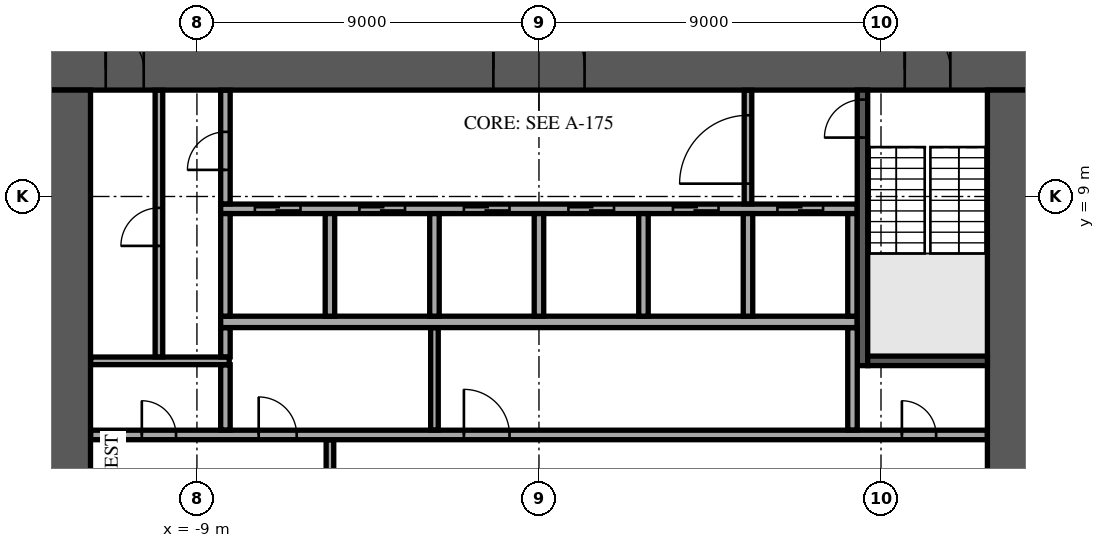
"""IFC4 building model, lengths in metres.
Left out: names, types, materials, properties, quantities, classifications, styles, units other than length and angle.
Written with IfcOpenShell. Run it as: python <this file> out.ifc"""

import sys

from ifc_helpers import new_model, si_unit, direction, frame, frame_2d, origin, place, context, subcontext, project, spatial, rectangle, extrude, element, fill, save


model = new_model("IFC4")
c1 = context("Model", 3, precision=1e-05, world=origin(), true_north=direction((0.0, 1.0)))
c2 = subcontext(c1, "Body", "Model", "MODEL_VIEW")
j1 = project(units=[si_unit("LENGTHUNIT", "METRE"), si_unit("PLANEANGLEUNIT", "RADIAN")], contexts=[c1])
p1 = place(None, origin())
s1 = spatial("IfcSite", under=j1, at=p1, CompositionType="ELEMENT")
p2 = place(p1, origin())
s2 = spatial("IfcBuilding", under=s1, at=p2, CompositionType="ELEMENT")
p3 = place(p2, frame((0.0, 0.0, 82.1)))
s3 = spatial("IfcBuildingStorey", under=s2, at=p3, CompositionType="ELEMENT", Elevation=82.1)
p4 = place(p3, frame((-12.9, 12.35, 0.0), z_axis=(0.0, 0.0, 1.0), x_axis=(1.0, 0.0, 0.0)))
e1 = element("IfcWall", 1, at=p4, inside=s3, PredefinedType="SHEAR", context=c2, shape_type="SweptSolid", body=[
    extrude(rectangle(XDim=25.8, YDim=1.1, at=frame_2d((12.9, 0.0))), origin(), (0.0, 0.0, 1.0), 3.58),
])
p5 = place(p4, frame((11.7, 0.0, 0.0)))
e2 = element("IfcOpeningElement", 2, at=p5, cuts=e1, PredefinedType="OPENING", context=c2, shape_type="SweptSolid", body=[
    extrude(rectangle(XDim=2.4, YDim=2.4, at=frame_2d((1.2, 1.2))), frame((0.0, 0.56, 0.0), z_axis=(0.0, -1.0, 0.0), x_axis=(1.0, 0.0, 0.0)), (0.0, 0.0, 1.0), 1.12),
])
p6 = place(p4, frame((22.525, 0.0, 0.0)))
e3 = element("IfcOpeningElement", 3, at=p6, cuts=e1, PredefinedType="OPENING", context=c2, shape_type="SweptSolid", body=[
    extrude(rectangle(XDim=1.2, YDim=2.1, at=frame_2d((0.6, 1.05))), frame((0.0, 0.56, 0.0), z_axis=(0.0, -1.0, 0.0), x_axis=(1.0, 0.0, 0.0)), (0.0, 0.0, 1.0), 1.12),
])
p7 = place(p4, frame((1.5, 0.0, 0.0)))
e4 = element("IfcOpeningElement", 4, at=p7, cuts=e1, PredefinedType="OPENING", context=c2, shape_type="SweptSolid", body=[
    extrude(rectangle(XDim=1.0, YDim=2.1, at=frame_2d((0.5, 1.05))), frame((0.0, 0.56, 0.0), z_axis=(0.0, -1.0, 0.0), x_axis=(1.0, 0.0, 0.0)), (0.0, 0.0, 1.0), 1.12),
])
p8 = place(p3, frame((12.35, -11.8, 0.0), z_axis=(0.0, 0.0, 1.0), x_axis=(0.0, 1.0, 0.0)))
e5 = element("IfcWall", 5, at=p8, inside=s3, PredefinedType="SHEAR", context=c2, shape_type="SweptSolid", body=[
    extrude(rectangle(XDim=23.6, YDim=1.1, at=frame_2d((11.8, 0.0))), origin(), (0.0, 0.0, 1.0), 3.58),
])
p9 = place(p8, frame((10.6, 0.0, 0.0)))
e6 = element("IfcOpeningElement", 6, at=p9, cuts=e5, PredefinedType="OPENING", context=c2, shape_type="SweptSolid", body=[
    extrude(rectangle(XDim=2.4, YDim=2.4, at=frame_2d((1.2, 1.2))), frame((0.0, 0.56, 0.0), z_axis=(0.0, -1.0, 0.0), x_axis=(1.0, 0.0, 0.0)), (0.0, 0.0, 1.0), 1.12),
])
p10 = place(p3, frame((-12.35, -11.8, 0.0), z_axis=(0.0, 0.0, 1.0), x_axis=(0.0, 1.0, 0.0)))
e7 = element("IfcWall", 7, at=p10, inside=s3, PredefinedType="SHEAR", context=c2, shape_type="SweptSolid", body=[
    extrude(rectangle(XDim=23.6, YDim=1.1, at=frame_2d((11.8, 0.0))), origin(), (0.0, 0.0, 1.0), 3.58),
])
p11 = place(p10, frame((10.6, 0.0, 0.0)))
e8 = element("IfcOpeningElement", 8, at=p11, cuts=e7, PredefinedType="OPENING", context=c2, shape_type="SweptSolid", body=[
    extrude(rectangle(XDim=2.4, YDim=2.4, at=frame_2d((1.2, 1.2))), frame((0.0, 0.56, 0.0), z_axis=(0.0, -1.0, 0.0), x_axis=(1.0, 0.0, 0.0)), (0.0, 0.0, 1.0), 1.12),
])
p12 = place(p3, frame((-8.375, 5.7, 0.0), z_axis=(0.0, 0.0, 1.0), x_axis=(1.0, 0.0, 0.0)))
e9 = element("IfcWall", 9, at=p12, inside=s3, PredefinedType="SOLIDWALL", context=c2, shape_type="SweptSolid", body=[
    extrude(rectangle(XDim=16.75, YDim=0.3, at=frame_2d((8.375, 0.0))), origin(), (0.0, 0.0, 1.0), 3.58),
])
p13 = place(p3, frame((-8.375, 8.675, 0.0), z_axis=(0.0, 0.0, 1.0), x_axis=(1.0, 0.0, 0.0)))
e10 = element("IfcWall", 10, at=p13, inside=s3, PredefinedType="SOLIDWALL", context=c2, shape_type="SweptSolid", body=[
    extrude(rectangle(XDim=16.75, YDim=0.25, at=frame_2d((8.375, 0.0))), origin(), (0.0, 0.0, 1.0), 3.58),
])
p14 = place(p13, frame((0.9, 0.0, 0.0)))
e11 = element("IfcOpeningElement", 11, at=p14, cuts=e10, PredefinedType="OPENING", context=c2, shape_type="SweptSolid", body=[
    extrude(rectangle(XDim=1.2, YDim=2.1, at=frame_2d((0.6, 1.05))), frame((0.0, 0.135, 0.0), z_axis=(0.0, -1.0, 0.0), x_axis=(1.0, 0.0, 0.0)), (0.0, 0.0, 1.0), 0.27),
])
p15 = place(p13, frame((3.65, 0.0, 0.0)))
e12 = element("IfcOpeningElement", 12, at=p15, cuts=e10, PredefinedType="OPENING", context=c2, shape_type="SweptSolid", body=[
    extrude(rectangle(XDim=1.2, YDim=2.1, at=frame_2d((0.6, 1.05))), frame((0.0, 0.135, 0.0), z_axis=(0.0, -1.0, 0.0), x_axis=(1.0, 0.0, 0.0)), (0.0, 0.0, 1.0), 0.27),
])
p16 = place(p13, frame((6.4, 0.0, 0.0)))
e13 = element("IfcOpeningElement", 13, at=p16, cuts=e10, PredefinedType="OPENING", context=c2, shape_type="SweptSolid", body=[
    extrude(rectangle(XDim=1.2, YDim=2.1, at=frame_2d((0.6, 1.05))), frame((0.0, 0.135, 0.0), z_axis=(0.0, -1.0, 0.0), x_axis=(1.0, 0.0, 0.0)), (0.0, 0.0, 1.0), 0.27),
])
p17 = place(p13, frame((9.15, 0.0, 0.0)))
e14 = element("IfcOpeningElement", 14, at=p17, cuts=e10, PredefinedType="OPENING", context=c2, shape_type="SweptSolid", body=[
    extrude(rectangle(XDim=1.2, YDim=2.1, at=frame_2d((0.6, 1.05))), frame((0.0, 0.135, 0.0), z_axis=(0.0, -1.0, 0.0), x_axis=(1.0, 0.0, 0.0)), (0.0, 0.0, 1.0), 0.27),
])
p18 = place(p13, frame((11.9, 0.0, 0.0)))
e15 = element("IfcOpeningElement", 15, at=p18, cuts=e10, PredefinedType="OPENING", context=c2, shape_type="SweptSolid", body=[
    extrude(rectangle(XDim=1.2, YDim=2.1, at=frame_2d((0.6, 1.05))), frame((0.0, 0.135, 0.0), z_axis=(0.0, -1.0, 0.0), x_axis=(1.0, 0.0, 0.0)), (0.0, 0.0, 1.0), 0.27),
])
p19 = place(p13, frame((14.65, 0.0, 0.0)))
e16 = element("IfcOpeningElement", 16, at=p19, cuts=e10, PredefinedType="OPENING", context=c2, shape_type="SweptSolid", body=[
    extrude(rectangle(XDim=1.2, YDim=2.1, at=frame_2d((0.6, 1.05))), frame((0.0, 0.135, 0.0), z_axis=(0.0, -1.0, 0.0), x_axis=(1.0, 0.0, 0.0)), (0.0, 0.0, 1.0), 0.27),
])
for number, where, z_axis, x_axis in (
    (17, (-8.25, 5.85, 0.0), (0.0, 0.0, 1.0), (0.0, 1.0, 0.0)),
    (18, (-5.5, 5.85, 0.0), (0.0, 0.0, 1.0), (0.0, 1.0, 0.0)),
    (19, (-2.75, 5.85, 0.0), (0.0, 0.0, 1.0), (0.0, 1.0, 0.0)),
    (20, (0.0, 5.85, 0.0), (0.0, 0.0, 1.0), (0.0, 1.0, 0.0)),
    (21, (2.75, 5.85, 0.0), (0.0, 0.0, 1.0), (0.0, 1.0, 0.0)),
    (22, (5.5, 5.85, 0.0), (0.0, 0.0, 1.0), (0.0, 1.0, 0.0)),
    (23, (8.25, 5.85, 0.0), (0.0, 0.0, 1.0), (0.0, 1.0, 0.0)),
):
    element("IfcWall", number, at=place(p3, frame(where, z_axis=z_axis, x_axis=x_axis)), inside=s3, PredefinedType="SOLIDWALL", context=c2, shape_type="SweptSolid", body=[
        extrude(rectangle(XDim=2.7, YDim=0.25, at=frame_2d((1.35, 0.0))), origin(), (0.0, 0.0, 1.0), 3.58),
    ])
p20 = place(p3, frame((8.512, 4.55, 0.0), z_axis=(0.0, 0.0, 1.0), x_axis=(0.0, 1.0, 0.0)))
e24 = element("IfcWall", 24, at=p20, inside=s3, PredefinedType="SOLIDWALL", context=c2, shape_type="SweptSolid", body=[
    extrude(rectangle(XDim=7.25, YDim=0.275, at=frame_2d((3.625, 0.0))), origin(), (0.0, 0.0, 1.0), 3.58),
])
p21 = place(p20, frame((6.0, 0.0, 0.0)))
e25 = element("IfcOpeningElement", 25, at=p21, cuts=e24, PredefinedType="OPENING", context=c2, shape_type="SweptSolid", body=[
    extrude(rectangle(XDim=1.0, YDim=2.1, at=frame_2d((0.5, 1.05))), frame((0.0, 0.147, 0.0), z_axis=(0.0, -1.0, 0.0), x_axis=(1.0, 0.0, 0.0)), (0.0, 0.0, 1.0), 0.295),
])
p22 = place(p3, frame((8.65, 4.675, 0.0), z_axis=(0.0, 0.0, 1.0), x_axis=(1.0, 0.0, 0.0)))
e26 = element("IfcWall", 26, at=p22, inside=s3, PredefinedType="SOLIDWALL", context=c2, shape_type="SweptSolid", body=[
    extrude(rectangle(XDim=3.15, YDim=0.25, at=frame_2d((1.575, 0.0))), origin(), (0.0, 0.0, 1.0), 3.58),
])
p23 = place(p3, frame((-5.5, -2.595, 0.0), z_axis=(0.0, 0.0, 1.0), x_axis=(0.0, 1.0, 0.0)))
e27 = element("IfcWall", 27, at=p23, inside=s3, PredefinedType="PARTITIONING", context=c2, shape_type="SweptSolid", body=[
    extrude(rectangle(XDim=5.19, YDim=0.2, at=frame_2d((2.595, 0.0))), origin(), (0.0, 0.0, 1.0), 3.58),
])
p24 = place(p23, frame((1.395, 0.0, 0.0)))
e28 = element("IfcOpeningElement", 28, at=p24, cuts=e27, PredefinedType="OPENING", context=c2, shape_type="SweptSolid", body=[
    extrude(rectangle(XDim=2.4, YDim=2.4, at=frame_2d((1.2, 1.2))), frame((0.0, 0.11, 0.0), z_axis=(0.0, -1.0, 0.0), x_axis=(1.0, 0.0, 0.0)), (0.0, 0.0, 1.0), 0.22),
])
p25 = place(p3, frame((-11.795, 2.725, 0.0), z_axis=(0.0, 0.0, 1.0), x_axis=(1.0, 0.0, 0.0)))
e29 = element("IfcWall", 29, at=p25, inside=s3, PredefinedType="PARTITIONING", context=c2, shape_type="SweptSolid", body=[
    extrude(rectangle(XDim=23.59, YDim=0.25, at=frame_2d((11.795, 0.0))), origin(), (0.0, 0.0, 1.0), 3.58),
])
p26 = place(p25, frame((21.345, 0.0, 0.0)))
e30 = element("IfcOpeningElement", 30, at=p26, cuts=e29, PredefinedType="OPENING", context=c2, shape_type="SweptSolid", body=[
    extrude(rectangle(XDim=0.9, YDim=2.1, at=frame_2d((0.45, 1.05))), frame((0.0, 0.135, 0.0), z_axis=(0.0, -1.0, 0.0), x_axis=(1.0, 0.0, 0.0)), (0.0, 0.0, 1.0), 0.27),
])
p27 = place(p25, frame((1.345, 0.0, 0.0)))
e31 = element("IfcOpeningElement", 31, at=p27, cuts=e29, PredefinedType="OPENING", context=c2, shape_type="SweptSolid", body=[
    extrude(rectangle(XDim=0.9, YDim=2.1, at=frame_2d((0.45, 1.05))), frame((0.0, 0.135, 0.0), z_axis=(0.0, -1.0, 0.0), x_axis=(1.0, 0.0, 0.0)), (0.0, 0.0, 1.0), 0.27),
])
p28 = place(p25, frame((4.42, 0.0, 0.0)))
e32 = element("IfcOpeningElement", 32, at=p28, cuts=e29, PredefinedType="OPENING", context=c2, shape_type="SweptSolid", body=[
    extrude(rectangle(XDim=1.0, YDim=2.1, at=frame_2d((0.5, 1.05))), frame((0.0, 0.135, 0.0), z_axis=(0.0, -1.0, 0.0), x_axis=(1.0, 0.0, 0.0)), (0.0, 0.0, 1.0), 0.27),
])
p29 = place(p25, frame((9.82, 0.0, 0.0)))
e33 = element("IfcOpeningElement", 33, at=p29, cuts=e29, PredefinedType="OPENING", context=c2, shape_type="SweptSolid", body=[
    extrude(rectangle(XDim=1.2, YDim=2.1, at=frame_2d((0.6, 1.05))), frame((0.0, 0.135, 0.0), z_axis=(0.0, -1.0, 0.0), x_axis=(1.0, 0.0, 0.0)), (0.0, 0.0, 1.0), 0.27),
])
p30 = place(p3, frame((-8.25, 2.855, 0.0), z_axis=(0.0, 0.0, 1.0), x_axis=(0.0, 1.0, 0.0)))
e34 = element("IfcWall", 34, at=p30, inside=s3, PredefinedType="PARTITIONING", context=c2, shape_type="SweptSolid", body=[
    extrude(rectangle(XDim=1.715, YDim=0.25, at=frame_2d((0.857, 0.0))), origin(), (0.0, 0.0, 1.0), 3.58),
])
p31 = place(p3, frame((-2.75, 2.855, 0.0), z_axis=(0.0, 0.0, 1.0), x_axis=(0.0, 1.0, 0.0)))
e35 = element("IfcWall", 35, at=p31, inside=s3, PredefinedType="PARTITIONING", context=c2, shape_type="SweptSolid", body=[
    extrude(rectangle(XDim=2.69, YDim=0.2, at=frame_2d((1.345, 0.0))), origin(), (0.0, 0.0, 1.0), 3.58),
])
p32 = place(p3, frame((8.25, 2.855, 0.0), z_axis=(0.0, 0.0, 1.0), x_axis=(0.0, 1.0, 0.0)))
e36 = element("IfcWall", 36, at=p32, inside=s3, PredefinedType="PARTITIONING", context=c2, shape_type="SweptSolid", body=[
    extrude(rectangle(XDim=2.69, YDim=0.25, at=frame_2d((1.345, 0.0))), origin(), (0.0, 0.0, 1.0), 3.58),
])
p33 = place(p3, frame((-11.795, 4.675, 0.0), z_axis=(0.0, 0.0, 1.0), x_axis=(1.0, 0.0, 0.0)))
e37 = element("IfcWall", 37, at=p33, inside=s3, PredefinedType="PARTITIONING", context=c2, shape_type="SweptSolid", body=[
    extrude(rectangle(XDim=3.645, YDim=0.2, at=frame_2d((1.823, 0.0))), origin(), (0.0, 0.0, 1.0), 3.58),
])
p34 = place(p3, frame((-10.0, 4.78, 0.0), z_axis=(0.0, 0.0, 1.0), x_axis=(0.0, 1.0, 0.0)))
e38 = element("IfcWall", 38, at=p34, inside=s3, PredefinedType="PARTITIONING", context=c2, shape_type="SweptSolid", body=[
    extrude(rectangle(XDim=7.015, YDim=0.2, at=frame_2d((3.507, 0.0))), origin(), (0.0, 0.0, 1.0), 3.58),
])
p35 = place(p34, frame((2.92, 0.0, 0.0)))
e39 = element("IfcOpeningElement", 39, at=p35, cuts=e38, PredefinedType="OPENING", context=c2, shape_type="SweptSolid", body=[
    extrude(rectangle(XDim=1.0, YDim=2.1, at=frame_2d((0.5, 1.05))), frame((0.0, 0.11, 0.0), z_axis=(0.0, -1.0, 0.0), x_axis=(1.0, 0.0, 0.0)), (0.0, 0.0, 1.0), 0.22),
])
p36 = place(p3, frame((-8.25, 4.78, 0.0), z_axis=(0.0, 0.0, 1.0), x_axis=(0.0, 1.0, 0.0)))
e40 = element("IfcWall", 40, at=p36, inside=s3, PredefinedType="PARTITIONING", context=c2, shape_type="SweptSolid", body=[
    extrude(rectangle(XDim=0.765, YDim=0.25, at=frame_2d((0.382, 0.0))), origin(), (0.0, 0.0, 1.0), 3.58),
])
p37 = place(p3, frame((-8.25, 8.805, 0.0), z_axis=(0.0, 0.0, 1.0), x_axis=(0.0, 1.0, 0.0)))
e41 = element("IfcWall", 41, at=p37, inside=s3, PredefinedType="PARTITIONING", context=c2, shape_type="SweptSolid", body=[
    extrude(rectangle(XDim=2.99, YDim=0.25, at=frame_2d((1.495, 0.0))), origin(), (0.0, 0.0, 1.0), 3.58),
])
p38 = place(p37, frame((0.895, 0.0, 0.0)))
e42 = element("IfcOpeningElement", 42, at=p38, cuts=e41, PredefinedType="OPENING", context=c2, shape_type="SweptSolid", body=[
    extrude(rectangle(XDim=1.0, YDim=2.1, at=frame_2d((0.5, 1.05))), frame((0.0, 0.135, 0.0), z_axis=(0.0, -1.0, 0.0), x_axis=(1.0, 0.0, 0.0)), (0.0, 0.0, 1.0), 0.27),
])
p39 = place(p3, frame((5.5, 8.805, 0.0), z_axis=(0.0, 0.0, 1.0), x_axis=(0.0, 1.0, 0.0)))
e43 = element("IfcWall", 43, at=p39, inside=s3, PredefinedType="PARTITIONING", context=c2, shape_type="SweptSolid", body=[
    extrude(rectangle(XDim=2.99, YDim=0.2, at=frame_2d((1.495, 0.0))), origin(), (0.0, 0.0, 1.0), 3.58),
])
p40 = place(p39, frame((0.532, 0.0, 0.0)))
e44 = element("IfcOpeningElement", 44, at=p40, cuts=e43, PredefinedType="OPENING", context=c2, shape_type="SweptSolid", body=[
    extrude(rectangle(XDim=1.8, YDim=2.1, at=frame_2d((0.9, 1.05))), frame((0.0, 0.11, 0.0), z_axis=(0.0, -1.0, 0.0), x_axis=(1.0, 0.0, 0.0)), (0.0, 0.0, 1.0), 0.22),
])
p41 = place(p5, origin())
e45 = element("IfcDoor", 45, at=p41, inside=s3, OperationType="SINGLE_SWING_LEFT", PredefinedType="DOOR", context=c2, shape_type="SweptSolid", body=[
    extrude(rectangle(XDim=2.4, YDim=2.4, at=frame_2d((1.2, 1.2))), frame((0.0, 0.025, 0.0), z_axis=(0.0, -1.0, 0.0), x_axis=(1.0, 0.0, 0.0)), (0.0, 0.0, 1.0), 0.05),
])
fill(e2, e45)
p42 = place(p6, origin())
e46 = element("IfcDoor", 46, at=p42, inside=s3, OperationType="SINGLE_SWING_LEFT", PredefinedType="DOOR", context=c2, shape_type="SweptSolid", body=[
    extrude(rectangle(XDim=1.2, YDim=2.1, at=frame_2d((0.6, 1.05))), frame((0.0, 0.025, 0.0), z_axis=(0.0, -1.0, 0.0), x_axis=(1.0, 0.0, 0.0)), (0.0, 0.0, 1.0), 0.05),
])
fill(e3, e46)
p43 = place(p7, origin())
e47 = element("IfcDoor", 47, at=p43, inside=s3, OperationType="SINGLE_SWING_LEFT", PredefinedType="DOOR", context=c2, shape_type="SweptSolid", body=[
    extrude(rectangle(XDim=1.0, YDim=2.1, at=frame_2d((0.5, 1.05))), frame((0.0, 0.025, 0.0), z_axis=(0.0, -1.0, 0.0), x_axis=(1.0, 0.0, 0.0)), (0.0, 0.0, 1.0), 0.05),
])
fill(e4, e47)
p44 = place(p14, origin())
e48 = element("IfcDoor", 48, at=p44, inside=s3, OperationType="DOUBLE_DOOR_SLIDING", PredefinedType="DOOR", context=c2, shape_type="SweptSolid", body=[
    extrude(rectangle(XDim=1.2, YDim=2.1, at=frame_2d((0.6, 1.05))), frame((0.0, 0.025, 0.0), z_axis=(0.0, -1.0, 0.0), x_axis=(1.0, 0.0, 0.0)), (0.0, 0.0, 1.0), 0.05),
])
fill(e11, e48)
p45 = place(p15, origin())
e49 = element("IfcDoor", 49, at=p45, inside=s3, OperationType="DOUBLE_DOOR_SLIDING", PredefinedType="DOOR", context=c2, shape_type="SweptSolid", body=[
    extrude(rectangle(XDim=1.2, YDim=2.1, at=frame_2d((0.6, 1.05))), frame((0.0, 0.025, 0.0), z_axis=(0.0, -1.0, 0.0), x_axis=(1.0, 0.0, 0.0)), (0.0, 0.0, 1.0), 0.05),
])
fill(e12, e49)
p46 = place(p16, origin())
e50 = element("IfcDoor", 50, at=p46, inside=s3, OperationType="DOUBLE_DOOR_SLIDING", PredefinedType="DOOR", context=c2, shape_type="SweptSolid", body=[
    extrude(rectangle(XDim=1.2, YDim=2.1, at=frame_2d((0.6, 1.05))), frame((0.0, 0.025, 0.0), z_axis=(0.0, -1.0, 0.0), x_axis=(1.0, 0.0, 0.0)), (0.0, 0.0, 1.0), 0.05),
])
fill(e13, e50)
p47 = place(p17, origin())
e51 = element("IfcDoor", 51, at=p47, inside=s3, OperationType="DOUBLE_DOOR_SLIDING", PredefinedType="DOOR", context=c2, shape_type="SweptSolid", body=[
    extrude(rectangle(XDim=1.2, YDim=2.1, at=frame_2d((0.6, 1.05))), frame((0.0, 0.025, 0.0), z_axis=(0.0, -1.0, 0.0), x_axis=(1.0, 0.0, 0.0)), (0.0, 0.0, 1.0), 0.05),
])
fill(e14, e51)
p48 = place(p18, origin())
e52 = element("IfcDoor", 52, at=p48, inside=s3, OperationType="DOUBLE_DOOR_SLIDING", PredefinedType="DOOR", context=c2, shape_type="SweptSolid", body=[
    extrude(rectangle(XDim=1.2, YDim=2.1, at=frame_2d((0.6, 1.05))), frame((0.0, 0.025, 0.0), z_axis=(0.0, -1.0, 0.0), x_axis=(1.0, 0.0, 0.0)), (0.0, 0.0, 1.0), 0.05),
])
fill(e15, e52)
p49 = place(p19, origin())
e53 = element("IfcDoor", 53, at=p49, inside=s3, OperationType="DOUBLE_DOOR_SLIDING", PredefinedType="DOOR", context=c2, shape_type="SweptSolid", body=[
    extrude(rectangle(XDim=1.2, YDim=2.1, at=frame_2d((0.6, 1.05))), frame((0.0, 0.025, 0.0), z_axis=(0.0, -1.0, 0.0), x_axis=(1.0, 0.0, 0.0)), (0.0, 0.0, 1.0), 0.05),
])
fill(e16, e53)
p50 = place(p21, origin())
e54 = element("IfcDoor", 54, at=p50, inside=s3, OperationType="SINGLE_SWING_LEFT", PredefinedType="DOOR", context=c2, shape_type="SweptSolid", body=[
    extrude(rectangle(XDim=1.0, YDim=2.1, at=frame_2d((0.5, 1.05))), frame((0.0, 0.025, 0.0), z_axis=(0.0, -1.0, 0.0), x_axis=(1.0, 0.0, 0.0)), (0.0, 0.0, 1.0), 0.05),
])
fill(e25, e54)
p51 = place(p26, origin())
e55 = element("IfcDoor", 55, at=p51, inside=s3, OperationType="SINGLE_SWING_LEFT", PredefinedType="DOOR", context=c2, shape_type="SweptSolid", body=[
    extrude(rectangle(XDim=0.9, YDim=2.1, at=frame_2d((0.45, 1.05))), frame((0.0, 0.025, 0.0), z_axis=(0.0, -1.0, 0.0), x_axis=(1.0, 0.0, 0.0)), (0.0, 0.0, 1.0), 0.05),
])
fill(e30, e55)
p52 = place(p27, origin())
e56 = element("IfcDoor", 56, at=p52, inside=s3, OperationType="SINGLE_SWING_LEFT", PredefinedType="DOOR", context=c2, shape_type="SweptSolid", body=[
    extrude(rectangle(XDim=0.9, YDim=2.1, at=frame_2d((0.45, 1.05))), frame((0.0, 0.025, 0.0), z_axis=(0.0, -1.0, 0.0), x_axis=(1.0, 0.0, 0.0)), (0.0, 0.0, 1.0), 0.05),
])
fill(e31, e56)
p53 = place(p35, origin())
e57 = element("IfcDoor", 57, at=p53, inside=s3, OperationType="SINGLE_SWING_LEFT", PredefinedType="DOOR", context=c2, shape_type="SweptSolid", body=[
    extrude(rectangle(XDim=1.0, YDim=2.1, at=frame_2d((0.5, 1.05))), frame((0.0, 0.025, 0.0), z_axis=(0.0, -1.0, 0.0), x_axis=(1.0, 0.0, 0.0)), (0.0, 0.0, 1.0), 0.05),
])
fill(e39, e57)
p54 = place(p38, origin())
e58 = element("IfcDoor", 58, at=p54, inside=s3, OperationType="SINGLE_SWING_LEFT", PredefinedType="DOOR", context=c2, shape_type="SweptSolid", body=[
    extrude(rectangle(XDim=1.0, YDim=2.1, at=frame_2d((0.5, 1.05))), frame((0.0, 0.025, 0.0), z_axis=(0.0, -1.0, 0.0), x_axis=(1.0, 0.0, 0.0)), (0.0, 0.0, 1.0), 0.05),
])
fill(e42, e58)
p55 = place(p28, origin())
e59 = element("IfcDoor", 59, at=p55, inside=s3, OperationType="SINGLE_SWING_LEFT", PredefinedType="DOOR", context=c2, shape_type="SweptSolid", body=[
    extrude(rectangle(XDim=1.0, YDim=2.1, at=frame_2d((0.5, 1.05))), frame((0.0, 0.025, 0.0), z_axis=(0.0, -1.0, 0.0), x_axis=(1.0, 0.0, 0.0)), (0.0, 0.0, 1.0), 0.05),
])
fill(e32, e59)
p56 = place(p29, origin())
e60 = element("IfcDoor", 60, at=p56, inside=s3, OperationType="SINGLE_SWING_LEFT", PredefinedType="DOOR", context=c2, shape_type="SweptSolid", body=[
    extrude(rectangle(XDim=1.2, YDim=2.1, at=frame_2d((0.6, 1.05))), frame((0.0, 0.025, 0.0), z_axis=(0.0, -1.0, 0.0), x_axis=(1.0, 0.0, 0.0)), (0.0, 0.0, 1.0), 0.05),
])
fill(e33, e60)
p57 = place(p40, origin())
e61 = element("IfcDoor", 61, at=p57, inside=s3, OperationType="SINGLE_SWING_LEFT", PredefinedType="DOOR", context=c2, shape_type="SweptSolid", body=[
    extrude(rectangle(XDim=1.8, YDim=2.1, at=frame_2d((0.9, 1.05))), frame((0.0, 0.025, 0.0), z_axis=(0.0, -1.0, 0.0), x_axis=(1.0, 0.0, 0.0)), (0.0, 0.0, 1.0), 0.05),
])
fill(e44, e61)
save(model, sys.argv[1])
